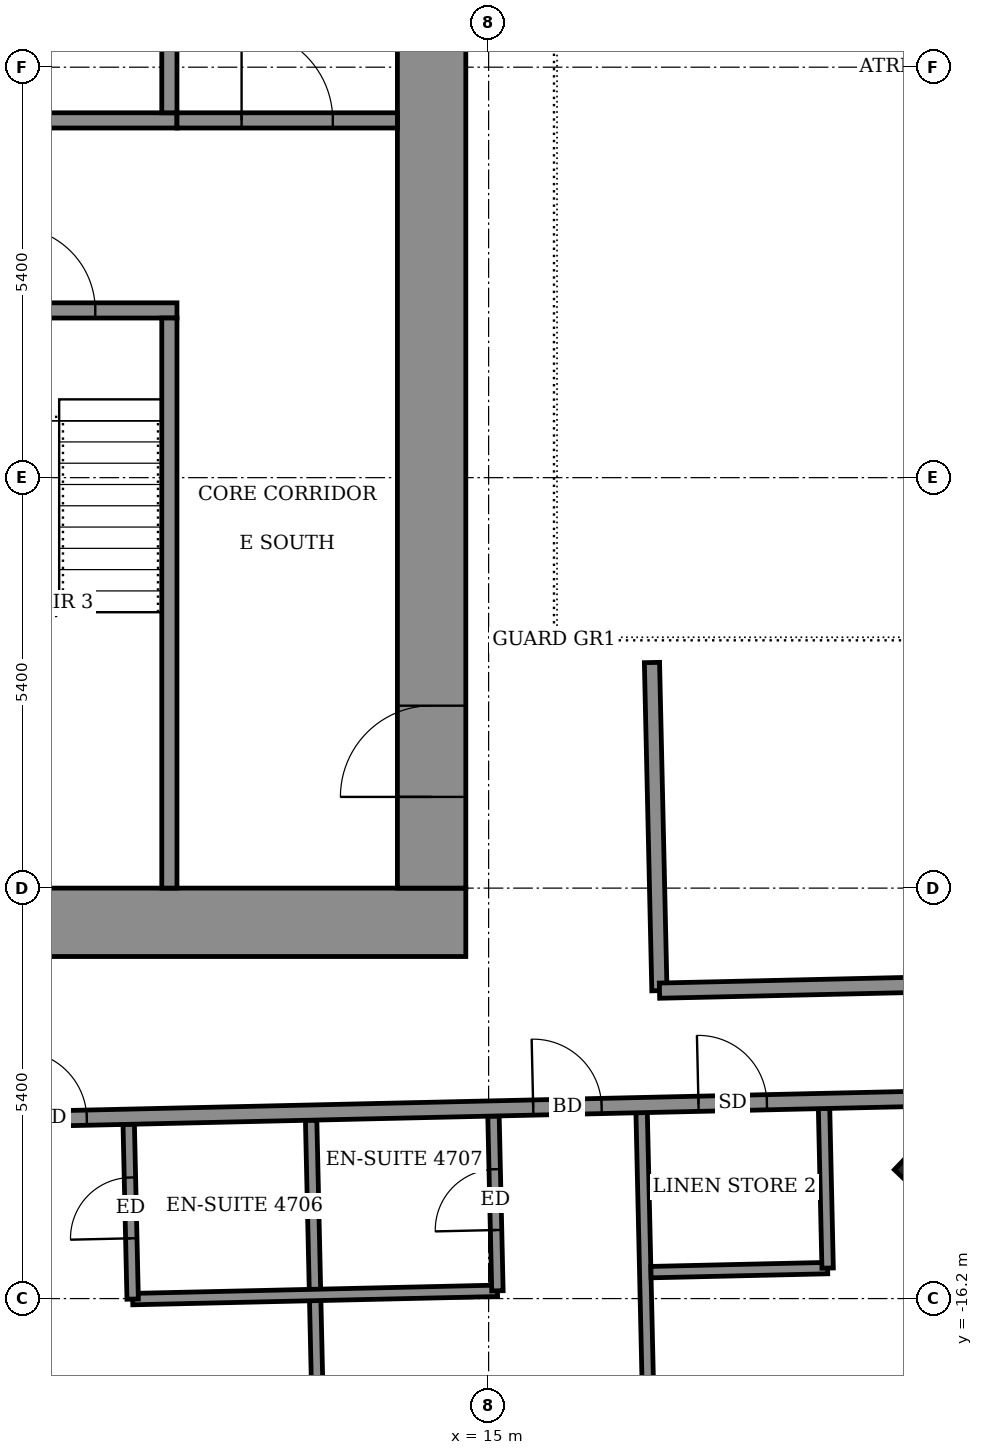
"""IFC4 building model, lengths in metres.
Left out: names, types, materials, properties, quantities, classifications, styles, units other than length and angle.
Written with IfcOpenShell. Run it as: python <this file> out.ifc"""

import sys

from ifc_helpers import new_model, si_unit, direction, frame, frame_2d, origin, origin_2d, place, context, subcontext, project, spatial, rectangle, extrude, element, fill, save


model = new_model("IFC4")
c1 = context("Model", 3, precision=1e-05, world=origin(), true_north=direction((0.0, 1.0)))
c2 = subcontext(c1, "Body", "Model", "MODEL_VIEW")
j1 = project(units=[si_unit("LENGTHUNIT", "METRE"), si_unit("PLANEANGLEUNIT", "RADIAN")], contexts=[c1])
p1 = place(None, origin())
s1 = spatial("IfcSite", under=j1, at=p1, CompositionType="ELEMENT")
p2 = place(p1, origin())
s2 = spatial("IfcBuilding", under=s1, at=p2, CompositionType="ELEMENT")
p3 = place(p2, frame((0.0, 0.0, 186.1)))
s3 = spatial("IfcBuildingStorey", under=s2, at=p3, CompositionType="ELEMENT", Elevation=186.1)
p4 = place(p3, frame((21.187, -14.486, -0.55), z_axis=(0.0, 0.0, 1.0), x_axis=(0.690872556232, 0.722976563275, 0.0)))
e1 = element("IfcColumn", 1, at=p4, inside=s3, PredefinedType="COLUMN", context=c2, shape_type="SweptSolid", body=[
    extrude(rectangle(XDim=1.2, YDim=1.2, at=origin_2d()), origin(), (0.0, 0.0, 1.0), 3.6),
])
p5 = place(p3, frame((12.806, -20.101, 0.0), z_axis=(0.0, 0.0, 1.0), x_axis=(-0.022540379945, 0.999745933361, 0.0)))
e2 = element("IfcWall", 2, at=p5, inside=s3, PredefinedType="PARTITIONING", context=c2, shape_type="SweptSolid", body=[
    extrude(rectangle(XDim=6.25, YDim=0.15, at=frame_2d((3.125, 0.0))), origin(), (0.0, 0.0, 1.0), 2.55),
])
p6 = place(p3, frame((17.155, -20.003, 0.0), z_axis=(0.0, 0.0, 1.0), x_axis=(-0.022732052173, 0.999741593515, 0.0)))
e3 = element("IfcWall", 3, at=p6, inside=s3, PredefinedType="PARTITIONING", context=c2, shape_type="SweptSolid", body=[
    extrude(rectangle(XDim=6.251, YDim=0.15, at=frame_2d((3.125, 0.0))), origin(), (0.0, 0.0, 1.0), 2.55),
])
p7 = place(p3, frame((10.317, -16.207, 0.0), z_axis=(0.0, 0.0, 1.0), x_axis=(0.99974154664, 0.022734113616, 0.0)))
e4 = element("IfcWall", 4, at=p7, inside=s3, PredefinedType="PARTITIONING", context=c2, shape_type="SweptSolid", body=[
    extrude(rectangle(XDim=4.8, YDim=0.15, at=frame_2d((2.4, 0.0))), origin(), (0.0, 0.0, 1.0), 3.05),
])
p8 = place(p3, frame((10.317, -16.207, 0.0), z_axis=(0.0, 0.0, 1.0), x_axis=(-0.022603288534, 0.999744513037, 0.0)))
e5 = element("IfcWall", 5, at=p8, inside=s3, PredefinedType="PARTITIONING", context=c2, shape_type="SweptSolid", body=[
    extrude(rectangle(XDim=2.301, YDim=0.15, at=frame_2d((1.15, 0.0))), origin(), (0.0, 0.0, 1.0), 3.05),
])
p9 = place(p8, frame((0.8, 0.0, 0.0)))
e6 = element("IfcOpeningElement", 6, at=p9, cuts=e5, PredefinedType="OPENING", context=c2, shape_type="SweptSolid", body=[
    extrude(rectangle(XDim=0.8, YDim=2.1, at=frame_2d((0.4, 1.05))), frame((0.0, 0.085, 0.0), z_axis=(0.0, -1.0, 0.0), x_axis=(1.0, 0.0, 0.0)), (0.0, 0.0, 1.0), 0.17),
])
p10 = place(p3, frame((15.116, -16.098, 0.0), z_axis=(0.0, 0.0, 1.0), x_axis=(-0.022615284993, 0.999744241736, 0.0)))
e7 = element("IfcWall", 7, at=p10, inside=s3, PredefinedType="PARTITIONING", context=c2, shape_type="SweptSolid", body=[
    extrude(rectangle(XDim=2.299, YDim=0.15, at=frame_2d((1.15, 0.0))), origin(), (0.0, 0.0, 1.0), 3.05),
])
p11 = place(p10, frame((0.8, 0.0, 0.0)))
e8 = element("IfcOpeningElement", 8, at=p11, cuts=e7, PredefinedType="OPENING", context=c2, shape_type="SweptSolid", body=[
    extrude(rectangle(XDim=0.8, YDim=2.1, at=frame_2d((0.4, 1.05))), frame((0.0, 0.085, 0.0), z_axis=(0.0, -1.0, 0.0), x_axis=(1.0, 0.0, 0.0)), (0.0, 0.0, 1.0), 0.17),
])
p12 = place(p3, frame((17.136, -15.852, 0.0), z_axis=(0.0, 0.0, 1.0), x_axis=(0.999740260747, 0.02279059109, 0.0)))
e9 = element("IfcWall", 9, at=p12, inside=s3, PredefinedType="PARTITIONING", context=c2, shape_type="SweptSolid", body=[
    extrude(rectangle(XDim=2.324, YDim=0.15, at=frame_2d((1.162, 0.0))), origin(), (0.0, 0.0, 1.0), 3.05),
])
p13 = place(p3, frame((19.46, -15.799, 0.0), z_axis=(0.0, 0.0, 1.0), x_axis=(-0.022325208909, 0.999750761464, 0.0)))
e10 = element("IfcWall", 10, at=p13, inside=s3, PredefinedType="PARTITIONING", context=c2, shape_type="SweptSolid", body=[
    extrude(rectangle(XDim=2.1, YDim=0.15, at=frame_2d((1.05, 0.0))), origin(), (0.0, 0.0, 1.0), 3.05),
])
p14 = place(p3, frame((-21.279, -14.523, 0.0), z_axis=(0.0, 0.0, 1.0), x_axis=(0.999742878501, 0.022675468818, 0.0)))
e11 = element("IfcWall", 11, at=p14, inside=s3, PredefinedType="PARTITIONING", context=c2, shape_type="SweptSolid", body=[
    extrude(rectangle(XDim=46.48, YDim=0.2, at=frame_2d((23.24, 0.0))), origin(), (0.0, 0.0, 1.0), 3.05),
])
p15 = place(p14, frame((1.4, 0.0, 0.0)))
e12 = element("IfcOpeningElement", 12, at=p15, cuts=e11, PredefinedType="OPENING", context=c2, shape_type="SweptSolid", body=[
    extrude(rectangle(XDim=1.0, YDim=2.1, at=frame_2d((0.5, 1.05))), frame((0.0, 0.11, 0.0), z_axis=(0.0, -1.0, 0.0), x_axis=(1.0, 0.0, 0.0)), (0.0, 0.0, 1.0), 0.22),
])
p16 = place(p14, frame((5.95, 0.0, 0.0)))
e13 = element("IfcOpeningElement", 13, at=p16, cuts=e11, PredefinedType="OPENING", context=c2, shape_type="SweptSolid", body=[
    extrude(rectangle(XDim=0.9, YDim=2.1, at=frame_2d((0.45, 1.05))), frame((0.0, 0.11, 0.0), z_axis=(0.0, -1.0, 0.0), x_axis=(1.0, 0.0, 0.0)), (0.0, 0.0, 1.0), 0.22),
])
p17 = place(p14, frame((10.575, 0.0, 0.0)))
e14 = element("IfcOpeningElement", 14, at=p17, cuts=e11, PredefinedType="OPENING", context=c2, shape_type="SweptSolid", body=[
    extrude(rectangle(XDim=0.9, YDim=2.1, at=frame_2d((0.45, 1.05))), frame((0.0, 0.11, 0.0), z_axis=(0.0, -1.0, 0.0), x_axis=(1.0, 0.0, 0.0)), (0.0, 0.0, 1.0), 0.22),
])
p18 = place(p14, frame((12.625, 0.0, 0.0)))
e15 = element("IfcOpeningElement", 15, at=p18, cuts=e11, PredefinedType="OPENING", context=c2, shape_type="SweptSolid", body=[
    extrude(rectangle(XDim=0.9, YDim=2.1, at=frame_2d((0.45, 1.05))), frame((0.0, 0.11, 0.0), z_axis=(0.0, -1.0, 0.0), x_axis=(1.0, 0.0, 0.0)), (0.0, 0.0, 1.0), 0.22),
])
p19 = place(p14, frame((19.4, 0.0, 0.0)))
e16 = element("IfcOpeningElement", 16, at=p19, cuts=e11, PredefinedType="OPENING", context=c2, shape_type="SweptSolid", body=[
    extrude(rectangle(XDim=0.9, YDim=2.1, at=frame_2d((0.45, 1.05))), frame((0.0, 0.11, 0.0), z_axis=(0.0, -1.0, 0.0), x_axis=(1.0, 0.0, 0.0)), (0.0, 0.0, 1.0), 0.22),
])
p20 = place(p14, frame((21.375, 0.0, 0.0)))
e17 = element("IfcOpeningElement", 17, at=p20, cuts=e11, PredefinedType="OPENING", context=c2, shape_type="SweptSolid", body=[
    extrude(rectangle(XDim=0.9, YDim=2.1, at=frame_2d((0.45, 1.05))), frame((0.0, 0.11, 0.0), z_axis=(0.0, -1.0, 0.0), x_axis=(1.0, 0.0, 0.0)), (0.0, 0.0, 1.0), 0.22),
])
p21 = place(p14, frame((28.15, 0.0, 0.0)))
e18 = element("IfcOpeningElement", 18, at=p21, cuts=e11, PredefinedType="OPENING", context=c2, shape_type="SweptSolid", body=[
    extrude(rectangle(XDim=0.9, YDim=2.1, at=frame_2d((0.45, 1.05))), frame((0.0, 0.11, 0.0), z_axis=(0.0, -1.0, 0.0), x_axis=(1.0, 0.0, 0.0)), (0.0, 0.0, 1.0), 0.22),
])
p22 = place(p14, frame((30.1, 0.0, 0.0)))
e19 = element("IfcOpeningElement", 19, at=p22, cuts=e11, PredefinedType="OPENING", context=c2, shape_type="SweptSolid", body=[
    extrude(rectangle(XDim=0.9, YDim=2.1, at=frame_2d((0.45, 1.05))), frame((0.0, 0.11, 0.0), z_axis=(0.0, -1.0, 0.0), x_axis=(1.0, 0.0, 0.0)), (0.0, 0.0, 1.0), 0.22),
])
p23 = place(p14, frame((36.875, 0.0, 0.0)))
e20 = element("IfcOpeningElement", 20, at=p23, cuts=e11, PredefinedType="OPENING", context=c2, shape_type="SweptSolid", body=[
    extrude(rectangle(XDim=0.9, YDim=2.1, at=frame_2d((0.45, 1.05))), frame((0.0, 0.11, 0.0), z_axis=(0.0, -1.0, 0.0), x_axis=(1.0, 0.0, 0.0)), (0.0, 0.0, 1.0), 0.22),
])
p24 = place(p14, frame((43.89, 0.0, 0.0)))
e21 = element("IfcOpeningElement", 21, at=p24, cuts=e11, PredefinedType="OPENING", context=c2, shape_type="SweptSolid", body=[
    extrude(rectangle(XDim=1.0, YDim=2.1, at=frame_2d((0.5, 1.05))), frame((0.0, 0.11, 0.0), z_axis=(0.0, -1.0, 0.0), x_axis=(1.0, 0.0, 0.0)), (0.0, 0.0, 1.0), 0.22),
])
p25 = place(p14, frame((39.05, 0.0, 0.0)))
e22 = element("IfcOpeningElement", 22, at=p25, cuts=e11, PredefinedType="OPENING", context=c2, shape_type="SweptSolid", body=[
    extrude(rectangle(XDim=0.9, YDim=2.1, at=frame_2d((0.45, 1.05))), frame((0.0, 0.11, 0.0), z_axis=(0.0, -1.0, 0.0), x_axis=(1.0, 0.0, 0.0)), (0.0, 0.0, 1.0), 0.22),
])
p26 = place(p3, frame((17.247, -12.149, 0.0), z_axis=(0.0, 0.0, 1.0), x_axis=(-0.022729111383, 0.999741660378, 0.0)))
e23 = element("IfcWall", 23, at=p26, inside=s3, PredefinedType="PARTITIONING", context=c2, shape_type="SweptSolid", body=[
    extrude(rectangle(XDim=4.318, YDim=0.2, at=frame_2d((2.159, 0.0))), origin(), (0.0, 0.0, 1.0), 3.05),
])
p27 = place(p3, frame((17.248, -12.149, 0.0), z_axis=(0.0, 0.0, 1.0), x_axis=(0.999741181744, 0.022750154412, 0.0)))
e24 = element("IfcWall", 24, at=p27, inside=s3, PredefinedType="PARTITIONING", context=c2, shape_type="SweptSolid", body=[
    extrude(rectangle(XDim=7.909, YDim=0.2, at=frame_2d((3.955, 0.0))), origin(), (0.0, 0.0, 1.0), 3.05),
])
p28 = place(p27, frame((4.155, 0.0, 0.0)))
e25 = element("IfcOpeningElement", 25, at=p28, cuts=e24, PredefinedType="OPENING", context=c2, shape_type="SweptSolid", body=[
    extrude(rectangle(XDim=1.0, YDim=2.1, at=frame_2d((0.5, 1.05))), frame((0.0, 0.11, 0.0), z_axis=(0.0, -1.0, 0.0), x_axis=(1.0, 0.0, 0.0)), (0.0, 0.0, 1.0), 0.22),
])
p29 = place(p3, frame((-14.7, -11.25, 0.0), z_axis=(0.0, 0.0, 1.0), x_axis=(1.0, 0.0, 0.0)))
e26 = element("IfcWall", 26, at=p29, inside=s3, PredefinedType="SHEAR", context=c2, shape_type="SweptSolid", body=[
    extrude(rectangle(XDim=29.4, YDim=0.9, at=frame_2d((14.7, 0.0))), origin(), (0.0, 0.0, 1.0), 3.6),
])
p30 = place(p3, frame((14.25, -10.8, 0.0), z_axis=(0.0, 0.0, 1.0), x_axis=(0.0, 1.0, 0.0)))
e27 = element("IfcWall", 27, at=p30, inside=s3, PredefinedType="SHEAR", context=c2, shape_type="SweptSolid", body=[
    extrude(rectangle(XDim=21.6, YDim=0.9, at=frame_2d((10.8, 0.0))), origin(), (0.0, 0.0, 1.0), 3.6),
])
p31 = place(p30, frame((1.2, 0.0, 0.0)))
e28 = element("IfcOpeningElement", 28, at=p31, cuts=e27, PredefinedType="OPENING", context=c2, shape_type="SweptSolid", body=[
    extrude(rectangle(XDim=1.2, YDim=2.1, at=frame_2d((0.6, 1.05))), frame((0.0, 0.46, 0.0), z_axis=(0.0, -1.0, 0.0), x_axis=(1.0, 0.0, 0.0)), (0.0, 0.0, 1.0), 0.92),
])
p32 = place(p3, frame((-10.9, -3.2, 0.0), z_axis=(0.0, 0.0, 1.0), x_axis=(1.0, 0.0, 0.0)))
e29 = element("IfcWall", 29, at=p32, inside=s3, PredefinedType="SHEAR", context=c2, shape_type="SweptSolid", body=[
    extrude(rectangle(XDim=21.8, YDim=0.2, at=frame_2d((10.9, 0.0))), origin(), (0.0, 0.0, 1.0), 3.05),
])
p33 = place(p32, frame((1.075, 0.0, 0.0)))
e30 = element("IfcOpeningElement", 30, at=p33, cuts=e29, PredefinedType="OPENING", context=c2, shape_type="SweptSolid", body=[
    extrude(rectangle(XDim=1.1, YDim=2.1, at=frame_2d((0.55, 1.05))), frame((0.0, 0.11, 0.0), z_axis=(0.0, -1.0, 0.0), x_axis=(1.0, 0.0, 0.0)), (0.0, 0.0, 1.0), 0.22),
])
p34 = place(p32, frame((10.325, 0.0, 0.0)))
e31 = element("IfcOpeningElement", 31, at=p34, cuts=e29, PredefinedType="OPENING", context=c2, shape_type="SweptSolid", body=[
    extrude(rectangle(XDim=1.1, YDim=2.1, at=frame_2d((0.55, 1.05))), frame((0.0, 0.11, 0.0), z_axis=(0.0, -1.0, 0.0), x_axis=(1.0, 0.0, 0.0)), (0.0, 0.0, 1.0), 0.22),
])
p35 = place(p32, frame((19.625, 0.0, 0.0)))
e32 = element("IfcOpeningElement", 32, at=p35, cuts=e29, PredefinedType="OPENING", context=c2, shape_type="SweptSolid", body=[
    extrude(rectangle(XDim=1.1, YDim=2.1, at=frame_2d((0.55, 1.05))), frame((0.0, 0.11, 0.0), z_axis=(0.0, -1.0, 0.0), x_axis=(1.0, 0.0, 0.0)), (0.0, 0.0, 1.0), 0.22),
])
p36 = place(p32, frame((5.7, 0.0, 0.0)))
e33 = element("IfcOpeningElement", 33, at=p36, cuts=e29, PredefinedType="OPENING", context=c2, shape_type="SweptSolid", body=[
    extrude(rectangle(XDim=1.1, YDim=2.1, at=frame_2d((0.55, 1.05))), frame((0.0, 0.11, 0.0), z_axis=(0.0, -1.0, 0.0), x_axis=(1.0, 0.0, 0.0)), (0.0, 0.0, 1.0), 0.22),
])
p37 = place(p32, frame((14.975, 0.0, 0.0)))
e34 = element("IfcOpeningElement", 34, at=p37, cuts=e29, PredefinedType="OPENING", context=c2, shape_type="SweptSolid", body=[
    extrude(rectangle(XDim=1.1, YDim=2.1, at=frame_2d((0.55, 1.05))), frame((0.0, 0.11, 0.0), z_axis=(0.0, -1.0, 0.0), x_axis=(1.0, 0.0, 0.0)), (0.0, 0.0, 1.0), 0.22),
])
p38 = place(p3, frame((-10.9, -0.7, 0.0), z_axis=(0.0, 0.0, 1.0), x_axis=(1.0, 0.0, 0.0)))
e35 = element("IfcWall", 35, at=p38, inside=s3, PredefinedType="SHEAR", context=c2, shape_type="SweptSolid", body=[
    extrude(rectangle(XDim=21.8, YDim=0.2, at=frame_2d((10.9, 0.0))), origin(), (0.0, 0.0, 1.0), 3.05),
])
p39 = place(p3, frame((10.8, -10.8, 0.0), z_axis=(0.0, 0.0, 1.0), x_axis=(0.0, 1.0, 0.0)))
e36 = element("IfcWall", 36, at=p39, inside=s3, PredefinedType="SHEAR", context=c2, shape_type="SweptSolid", body=[
    extrude(rectangle(XDim=7.5, YDim=0.2, at=frame_2d((3.75, 0.0))), origin(), (0.0, 0.0, 1.0), 3.05),
])
p40 = place(p3, frame((10.8, -0.6, 0.0), z_axis=(0.0, 0.0, 1.0), x_axis=(0.0, 1.0, 0.0)))
e37 = element("IfcWall", 37, at=p40, inside=s3, PredefinedType="SHEAR", context=c2, shape_type="SweptSolid", body=[
    extrude(rectangle(XDim=2.5, YDim=0.2, at=frame_2d((1.25, 0.0))), origin(), (0.0, 0.0, 1.0), 3.05),
])
p41 = place(p3, frame((10.9, -0.7, 0.0), z_axis=(0.0, 0.0, 1.0), x_axis=(1.0, 0.0, 0.0)))
e38 = element("IfcWall", 38, at=p41, inside=s3, PredefinedType="STANDARD", context=c2, shape_type="SweptSolid", body=[
    extrude(rectangle(XDim=2.9, YDim=0.2, at=frame_2d((1.45, 0.0))), origin(), (0.0, 0.0, 1.0), 3.05),
])
p42 = place(p41, frame((0.85, 0.0, 0.0)))
e39 = element("IfcOpeningElement", 39, at=p42, cuts=e38, PredefinedType="OPENING", context=c2, shape_type="SweptSolid", body=[
    extrude(rectangle(XDim=1.2, YDim=2.1, at=frame_2d((0.6, 1.05))), frame((0.0, 0.11, 0.0), z_axis=(0.0, -1.0, 0.0), x_axis=(1.0, 0.0, 0.0)), (0.0, 0.0, 1.0), 0.22),
])
p43 = place(p22, origin())
e40 = element("IfcDoor", 40, at=p43, inside=s3, OperationType="SINGLE_SWING_RIGHT", PredefinedType="DOOR", context=c2, shape_type="SweptSolid", body=[
    extrude(rectangle(XDim=0.9, YDim=2.1, at=frame_2d((0.45, 1.05))), frame((0.0, 0.025, 0.0), z_axis=(0.0, -1.0, 0.0), x_axis=(1.0, 0.0, 0.0)), (0.0, 0.0, 1.0), 0.05),
])
fill(e19, e40)
p44 = place(p9, origin())
e41 = element("IfcDoor", 41, at=p44, inside=s3, OperationType="SINGLE_SWING_RIGHT", PredefinedType="DOOR", context=c2, shape_type="SweptSolid", body=[
    extrude(rectangle(XDim=0.8, YDim=2.1, at=frame_2d((0.4, 1.05))), frame((0.0, 0.025, 0.0), z_axis=(0.0, -1.0, 0.0), x_axis=(1.0, 0.0, 0.0)), (0.0, 0.0, 1.0), 0.05),
])
fill(e6, e41)
p45 = place(p23, origin())
e42 = element("IfcDoor", 42, at=p45, inside=s3, OperationType="SINGLE_SWING_LEFT", PredefinedType="DOOR", context=c2, shape_type="SweptSolid", body=[
    extrude(rectangle(XDim=0.9, YDim=2.1, at=frame_2d((0.45, 1.05))), frame((0.0, 0.025, 0.0), z_axis=(0.0, -1.0, 0.0), x_axis=(1.0, 0.0, 0.0)), (0.0, 0.0, 1.0), 0.05),
])
fill(e20, e42)
p46 = place(p11, origin())
e43 = element("IfcDoor", 43, at=p46, inside=s3, OperationType="SINGLE_SWING_LEFT", PredefinedType="DOOR", context=c2, shape_type="SweptSolid", body=[
    extrude(rectangle(XDim=0.8, YDim=2.1, at=frame_2d((0.4, 1.05))), frame((0.0, 0.025, 0.0), z_axis=(0.0, -1.0, 0.0), x_axis=(1.0, 0.0, 0.0)), (0.0, 0.0, 1.0), 0.05),
])
fill(e8, e43)
p47 = place(p25, origin())
e44 = element("IfcDoor", 44, at=p47, inside=s3, OperationType="SINGLE_SWING_RIGHT", PredefinedType="DOOR", context=c2, shape_type="SweptSolid", body=[
    extrude(rectangle(XDim=0.9, YDim=2.1, at=frame_2d((0.45, 1.05))), frame((0.0, 0.025, 0.0), z_axis=(0.0, -1.0, 0.0), x_axis=(1.0, 0.0, 0.0)), (0.0, 0.0, 1.0), 0.05),
])
fill(e22, e44)
p48 = place(p31, origin())
e45 = element("IfcDoor", 45, at=p48, inside=s3, OperationType="DOUBLE_DOOR_SINGLE_SWING", PredefinedType="DOOR", context=c2, shape_type="SweptSolid", body=[
    extrude(rectangle(XDim=1.2, YDim=2.1, at=frame_2d((0.6, 1.05))), frame((0.0, 0.025, 0.0), z_axis=(0.0, -1.0, 0.0), x_axis=(1.0, 0.0, 0.0)), (0.0, 0.0, 1.0), 0.05),
])
fill(e28, e45)
p49 = place(p35, origin())
e46 = element("IfcDoor", 46, at=p49, inside=s3, OperationType="SINGLE_SWING_RIGHT", PredefinedType="DOOR", context=c2, shape_type="SweptSolid", body=[
    extrude(rectangle(XDim=1.1, YDim=2.1, at=frame_2d((0.55, 1.05))), frame((0.0, 0.025, 0.0), z_axis=(0.0, -1.0, 0.0), x_axis=(1.0, 0.0, 0.0)), (0.0, 0.0, 1.0), 0.05),
])
fill(e32, e46)
p50 = place(p42, origin())
e47 = element("IfcDoor", 47, at=p50, inside=s3, OperationType="SINGLE_SWING_LEFT", PredefinedType="DOOR", context=c2, shape_type="SweptSolid", body=[
    extrude(rectangle(XDim=1.2, YDim=2.1, at=frame_2d((0.6, 1.05))), frame((0.0, 0.025, 0.0), z_axis=(0.0, -1.0, 0.0), x_axis=(1.0, 0.0, 0.0)), (0.0, 0.0, 1.0), 0.05),
])
fill(e39, e47)
save(model, sys.argv[1])
